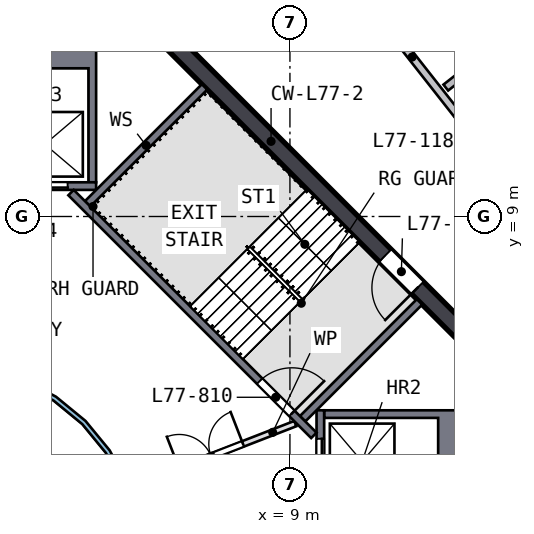
"""IFC4 building model, lengths in metres.
Left out: names, types, materials, properties, quantities, classifications, styles, units other than length and angle.
Written with IfcOpenShell. Run it as: python <this file> out.ifc"""

import sys

from ifc_helpers import new_model, si_unit, direction, frame, frame_2d, origin, place, context, subcontext, project, spatial, polyline, rectangle, outline, extrude, element, fill, save


model = new_model("IFC4")
c1 = context("Model", 3, precision=1e-05, world=origin(), true_north=direction((0.0, 1.0)))
c2 = subcontext(c1, "Body", "Model", "MODEL_VIEW")
j1 = project(units=[si_unit("LENGTHUNIT", "METRE"), si_unit("PLANEANGLEUNIT", "RADIAN")], contexts=[c1])
p1 = place(None, origin())
s1 = spatial("IfcSite", under=j1, at=p1, CompositionType="ELEMENT")
p2 = place(p1, origin())
s2 = spatial("IfcBuilding", under=s1, at=p2, CompositionType="ELEMENT")
p3 = place(p2, frame((0.0, 0.0, 310.0)))
s3 = spatial("IfcBuildingStorey", under=s2, at=p3, CompositionType="ELEMENT", Elevation=310.0)
p4 = place(p3, frame((13.841, 5.64, 0.0), z_axis=(0.0, 0.0, 1.0), x_axis=(-0.707106781, 0.707106781, 0.0)))
e1 = element("IfcWall", 1, at=p4, inside=s3, PredefinedType="SHEAR", context=c2, shape_type="SweptSolid", body=[
    extrude(rectangle(XDim=11.598, YDim=0.45, at=frame_2d((5.799, 0.0))), origin(), (0.0, 0.0, 1.0), 5.0),
])
p5 = place(p4, frame((2.099, 0.0, 0.0)))
e2 = element("IfcOpeningElement", 2, at=p5, cuts=e1, PredefinedType="OPENING", context=c2, shape_type="SweptSolid", body=[
    extrude(rectangle(XDim=1.2, YDim=2.1, at=frame_2d((0.6, 1.05))), frame((0.0, 0.235, 0.0), z_axis=(0.0, -1.0, 0.0), x_axis=(1.0, 0.0, 0.0)), (0.0, 0.0, 1.0), 0.47),
])
p6 = place(p3, origin())
e3 = element("IfcWall", 3, at=p6, inside=s3, PredefinedType="SOLIDWALL", context=c2, shape_type="SweptSolid", body=[
    extrude(outline(polyline([(13.55, 3.9), (13.55, 1.2), (9.9, 1.2), (9.9, 1.4), (12.9, 1.4), (12.9, 3.7), (9.9, 3.7), (9.9, 3.9), (13.55, 3.9)])), origin(), (0.0, 0.0, 1.0), 4.6),
])
p7 = place(p3, frame((9.8, 1.2, 0.0), z_axis=(0.0, 0.0, 1.0), x_axis=(0.0, 1.0, 0.0)))
e4 = element("IfcWall", 4, at=p7, inside=s3, PredefinedType="SOLIDWALL", context=c2, shape_type="SweptSolid", body=[
    extrude(rectangle(XDim=2.7, YDim=0.2, at=frame_2d((1.35, 0.0))), origin(), (0.0, 0.0, 1.0), 4.6),
])
p8 = place(p7, frame((0.75, 0.0, 0.0)))
e5 = element("IfcOpeningElement", 5, at=p8, cuts=e4, PredefinedType="OPENING", context=c2, shape_type="SweptSolid", body=[
    extrude(rectangle(XDim=1.2, YDim=2.1, at=frame_2d((0.6, 1.05))), frame((0.0, 0.11, 0.0), z_axis=(0.0, -1.0, 0.0), x_axis=(1.0, 0.0, 0.0)), (0.0, 0.0, 1.0), 0.22),
])
p9 = place(p3, origin())
e6 = element("IfcWall", 6, at=p9, inside=s3, PredefinedType="SOLIDWALL", context=c2, shape_type="SweptSolid", body=[
    extrude(outline(polyline([(3.9, 9.9), (3.7, 9.9), (3.7, 12.9), (1.4, 12.9), (1.4, 9.9), (1.2, 9.9), (1.2, 13.55), (3.9, 13.55), (3.9, 9.9)])), origin(), (0.0, 0.0, 1.0), 4.6),
])
p10 = place(p3, frame((1.2, 9.8, 0.0), z_axis=(0.0, 0.0, 1.0), x_axis=(1.0, 0.0, 0.0)))
e7 = element("IfcWall", 7, at=p10, inside=s3, PredefinedType="SOLIDWALL", context=c2, shape_type="SweptSolid", body=[
    extrude(rectangle(XDim=2.7, YDim=0.2, at=frame_2d((1.35, 0.0))), origin(), (0.0, 0.0, 1.0), 4.6),
])
p11 = place(p10, frame((0.75, 0.0, 0.0)))
e8 = element("IfcOpeningElement", 8, at=p11, cuts=e7, PredefinedType="OPENING", context=c2, shape_type="SweptSolid", body=[
    extrude(rectangle(XDim=1.2, YDim=2.1, at=frame_2d((0.6, 1.05))), frame((0.0, 0.11, 0.0), z_axis=(0.0, -1.0, 0.0), x_axis=(1.0, 0.0, 0.0)), (0.0, 0.0, 1.0), 0.22),
])
p12 = place(p3, frame((3.24, 9.629, 0.0), z_axis=(0.0, 0.0, 1.0), x_axis=(0.707106781, -0.707106781, 0.0)))
e9 = element("IfcWall", 9, at=p12, inside=s3, PredefinedType="SOLIDWALL", context=c2, shape_type="SweptSolid", body=[
    extrude(rectangle(XDim=9.036, YDim=0.2, at=frame_2d((4.518, 0.0))), origin(), (0.0, 0.0, 1.0), 4.6),
])
p13 = place(p12, frame((7.018, 0.0, 0.0)))
e10 = element("IfcOpeningElement", 10, at=p13, cuts=e9, PredefinedType="OPENING", context=c2, shape_type="SweptSolid", body=[
    extrude(rectangle(XDim=1.2, YDim=2.1, at=frame_2d((0.6, 1.05))), frame((0.0, 0.11, 0.0), z_axis=(0.0, -1.0, 0.0), x_axis=(1.0, 0.0, 0.0)), (0.0, 0.0, 1.0), 0.22),
])
for number, where, z_axis, x_axis in (
    (11, (9.334, 3.677, 0.0), (0.0, 0.0, 1.0), (0.707, 0.707, 0.0)),
    (12, (3.677, 9.334, 0.0), (0.0, 0.0, 1.0), (0.707, 0.707, 0.0)),
):
    element("IfcWall", number, at=place(p3, frame(where, z_axis=z_axis, x_axis=x_axis)), inside=s3, PredefinedType="SOLIDWALL", context=c2, shape_type="SweptSolid", body=[
        extrude(rectangle(XDim=4.35, YDim=0.2, at=frame_2d((2.175, 0.0))), origin(), (0.0, 0.0, 1.0), 4.6),
    ])
p14 = place(p3, frame((4.782, 1.857, 0.0), z_axis=(0.0, 0.0, 1.0), x_axis=(0.932167228, 0.36202798, 0.0)))
e13 = element("IfcWall", 13, at=p14, inside=s3, PredefinedType="PARTITIONING", context=c2, shape_type="SweptSolid", body=[
    extrude(rectangle(XDim=4.676, YDim=0.15, at=frame_2d((2.338, 0.0))), origin(), (0.0, 0.0, 1.0), 4.6),
])
p15 = place(p14, frame((1.4, 0.0, 0.0)))
e14 = element("IfcOpeningElement", 14, at=p15, cuts=e13, PredefinedType="OPENING", context=c2, shape_type="SweptSolid", body=[
    extrude(rectangle(XDim=1.8, YDim=2.1, at=frame_2d((0.9, 1.05))), frame((0.0, 0.085, 0.0), z_axis=(0.0, -1.0, 0.0), x_axis=(1.0, 0.0, 0.0)), (0.0, 0.0, 1.0), 0.17),
])
p16 = place(p3, origin())
e15 = element("IfcWall", 15, at=p16, inside=s3, PredefinedType="SOLIDWALL", context=c2, shape_type="SweptSolid", body=[
    extrude(outline(polyline([(5.021, -0.999), (4.73, -1.959), (4.257, -2.844), (3.62, -3.62), (2.844, -4.257), (1.959, -4.73), (0.999, -5.021), (0.0, -5.12), (-0.999, -5.021), (-1.959, -4.73), (-2.844, -4.257), (-3.62, -3.62), (-4.257, -2.844), (-4.73, -1.959), (-5.021, -0.999), (-5.12, 0.0), (-5.021, 0.999), (-4.73, 1.959), (-4.257, 2.844), (-3.62, 3.62), (-2.844, 4.257), (-1.959, 4.73), (-0.999, 5.021), (0.0, 5.12), (0.999, 5.021), (1.959, 4.73), (2.844, 4.257), (3.62, 3.62), (4.257, 2.844), (4.73, 1.959), (5.021, 0.999), (5.12, 0.0), (5.021, -0.999)]), holes=[polyline([(4.904, 0.976), (4.619, 1.913), (4.157, 2.778), (3.535, 3.535), (2.778, 4.157), (1.913, 4.619), (0.976, 4.904), (0.0, 5.0), (-0.976, 4.904), (-1.913, 4.619), (-2.778, 4.157), (-3.535, 3.535), (-4.157, 2.778), (-4.619, 1.913), (-4.904, 0.976), (-5.0, 0.0), (-4.904, -0.976), (-4.619, -1.913), (-4.157, -2.778), (-3.535, -3.535), (-2.778, -4.157), (-1.913, -4.619), (-0.976, -4.904), (0.0, -5.0), (0.976, -4.904), (1.913, -4.619), (2.778, -4.157), (3.535, -3.535), (4.157, -2.778), (4.619, -1.913), (4.904, -0.976), (5.0, 0.0), (4.904, 0.976)])]), origin(), (0.0, 0.0, 1.0), 4.6),
])
p17 = place(p3, frame((11.147, 14.556, 0.0), z_axis=(0.0, 0.0, 1.0), x_axis=(0.617852301, -0.786294178, 0.0)))
e16 = element("IfcWall", 16, at=p17, inside=s3, PredefinedType="SOLIDWALL", context=c2, shape_type="SweptSolid", body=[
    extrude(rectangle(XDim=9.117, YDim=0.2, at=frame_2d((4.558, 0.0))), origin(), (0.0, 0.0, 1.0), 4.6),
])
p18 = place(p17, frame((3.659, 0.0, 0.0)))
e17 = element("IfcOpeningElement", 17, at=p18, cuts=e16, PredefinedType="OPENING", context=c2, shape_type="SweptSolid", body=[
    extrude(rectangle(XDim=1.8, YDim=2.1, at=frame_2d((0.9, 1.05))), frame((0.0, 0.11, 0.0), z_axis=(0.0, -1.0, 0.0), x_axis=(1.0, 0.0, 0.0)), (0.0, 0.0, 1.0), 0.22),
])
p19 = place(p3, frame((13.102, 12.392, 0.0), z_axis=(0.0, 0.0, 1.0), x_axis=(0.786280326, 0.617869929, 0.0)))
e18 = element("IfcWall", 18, at=p19, inside=s3, PredefinedType="SOLIDWALL", context=c2, shape_type="SweptSolid", body=[
    extrude(rectangle(XDim=10.252, YDim=0.2, at=frame_2d((5.126, 0.0))), origin(), (0.0, 0.0, 1.0), 4.6),
])
p20 = place(p19, frame((2.95, 0.0, 0.0)))
e19 = element("IfcOpeningElement", 19, at=p20, cuts=e18, PredefinedType="OPENING", context=c2, shape_type="SweptSolid", body=[
    extrude(rectangle(XDim=1.0, YDim=2.1, at=frame_2d((0.5, 1.05))), frame((0.0, 0.11, 0.0), z_axis=(0.0, -1.0, 0.0), x_axis=(1.0, 0.0, 0.0)), (0.0, 0.0, 1.0), 0.22),
])
p21 = place(p8, origin())
e20 = element("IfcDoor", 20, at=p21, inside=s3, OperationType="DOUBLE_DOOR_SLIDING", PredefinedType="DOOR", context=c2, shape_type="SweptSolid", body=[
    extrude(rectangle(XDim=1.2, YDim=2.1, at=frame_2d((0.6, 1.05))), frame((0.0, 0.025, 0.0), z_axis=(0.0, -1.0, 0.0), x_axis=(1.0, 0.0, 0.0)), (0.0, 0.0, 1.0), 0.05),
])
fill(e5, e20)
p22 = place(p11, origin())
e21 = element("IfcDoor", 21, at=p22, inside=s3, OperationType="DOUBLE_DOOR_SLIDING", PredefinedType="DOOR", context=c2, shape_type="SweptSolid", body=[
    extrude(rectangle(XDim=1.2, YDim=2.1, at=frame_2d((0.6, 1.05))), frame((0.0, 0.025, 0.0), z_axis=(0.0, -1.0, 0.0), x_axis=(1.0, 0.0, 0.0)), (0.0, 0.0, 1.0), 0.05),
])
fill(e8, e21)
p23 = place(p13, origin())
e22 = element("IfcDoor", 22, at=p23, inside=s3, OperationType="SINGLE_SWING_RIGHT", PredefinedType="DOOR", context=c2, shape_type="SweptSolid", body=[
    extrude(rectangle(XDim=1.2, YDim=2.1, at=frame_2d((0.6, 1.05))), frame((0.0, 0.025, 0.0), z_axis=(0.0, -1.0, 0.0), x_axis=(1.0, 0.0, 0.0)), (0.0, 0.0, 1.0), 0.05),
])
fill(e10, e22)
p24 = place(p5, origin())
e23 = element("IfcDoor", 23, at=p24, inside=s3, OperationType="SINGLE_SWING_LEFT", PredefinedType="DOOR", context=c2, shape_type="SweptSolid", body=[
    extrude(rectangle(XDim=1.2, YDim=2.1, at=frame_2d((0.6, 1.05))), frame((0.0, 0.025, 0.0), z_axis=(0.0, -1.0, 0.0), x_axis=(1.0, 0.0, 0.0)), (0.0, 0.0, 1.0), 0.05),
])
fill(e2, e23)
p25 = place(p15, origin())
e24 = element("IfcDoor", 24, at=p25, inside=s3, OperationType="DOUBLE_DOOR_SINGLE_SWING", PredefinedType="DOOR", context=c2, shape_type="SweptSolid", body=[
    extrude(rectangle(XDim=1.8, YDim=2.1, at=frame_2d((0.9, 1.05))), frame((0.0, 0.025, 0.0), z_axis=(0.0, -1.0, 0.0), x_axis=(1.0, 0.0, 0.0)), (0.0, 0.0, 1.0), 0.05),
])
fill(e14, e24)
save(model, sys.argv[1])
